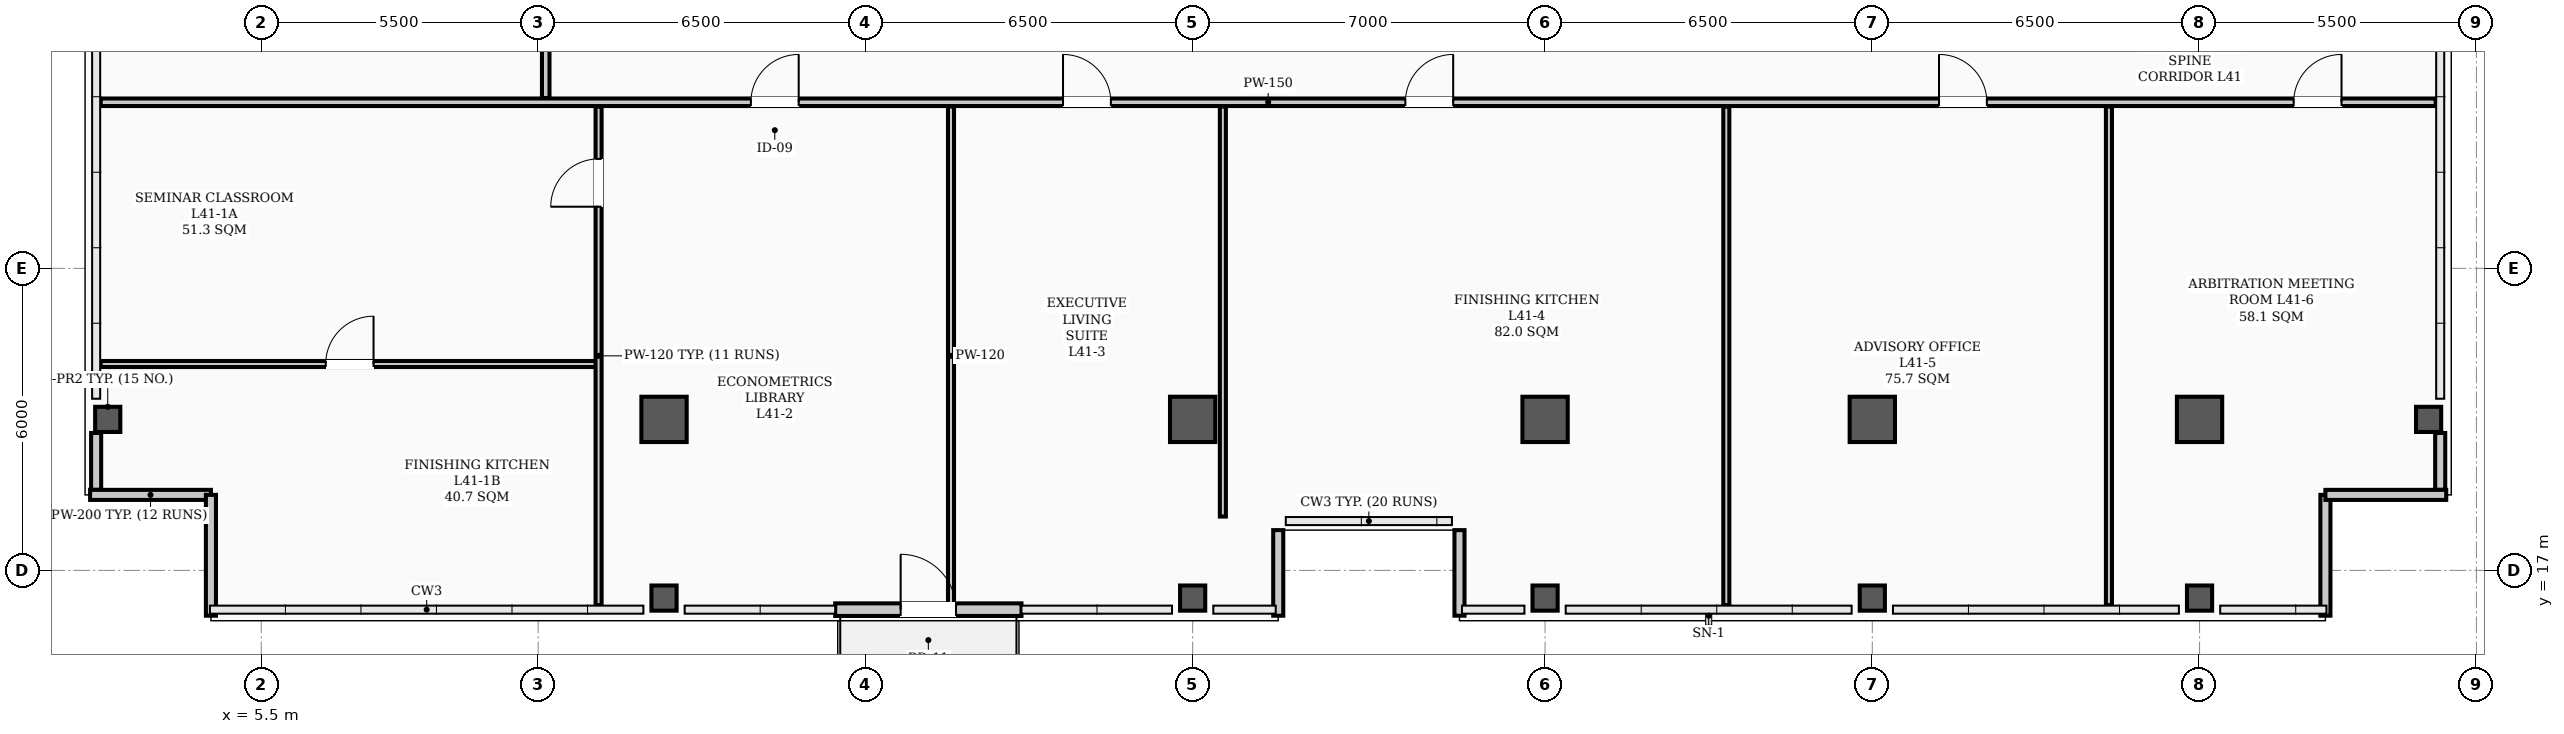
"""IFC4 building model, lengths in metres.
Left out: names, types, materials, properties, quantities, classifications, styles, units other than length and angle.
Written with IfcOpenShell. Run it as: python <this file> out.ifc"""

import sys

from ifc_helpers import new_model, si_unit, direction, frame, frame_2d, origin, origin_2d, place, context, subcontext, project, spatial, rectangle, hollow_rectangle, extrude, element, fill, save


model = new_model("IFC4")
c1 = context("Model", 3, precision=1e-05, world=origin(), true_north=direction((0.0, 1.0)))
c2 = subcontext(c1, "Body", "Model", "MODEL_VIEW")
j1 = project(units=[si_unit("LENGTHUNIT", "METRE"), si_unit("PLANEANGLEUNIT", "RADIAN")], contexts=[c1])
p1 = place(None, origin())
s1 = spatial("IfcSite", under=j1, at=p1, CompositionType="ELEMENT")
p2 = place(p1, origin())
s2 = spatial("IfcBuilding", under=s1, at=p2, CompositionType="ELEMENT")
p3 = place(p2, frame((0.0, 0.0, 165.6)))
s3 = spatial("IfcBuildingStorey", under=s2, at=p3, CompositionType="ELEMENT", Elevation=165.6)
for number, where, z_axis, x_axis in (
    (1, (13.5, 20.0, 0.0), (0.0, 0.0, 1.0), (1.0, 0.0, 0.0)),
    (2, (24.0, 20.0, 0.0), (0.0, 0.0, 1.0), (1.0, 0.0, 0.0)),
    (3, (31.0, 20.0, 0.0), (0.0, 0.0, 1.0), (1.0, 0.0, 0.0)),
    (4, (37.5, 20.0, 0.0), (0.0, 0.0, 1.0), (1.0, 0.0, 0.0)),
    (5, (44.0, 20.0, 0.0), (0.0, 0.0, 1.0), (1.0, 0.0, 0.0)),
):
    element("IfcColumn", number, at=place(p3, frame(where, z_axis=z_axis, x_axis=x_axis)), inside=s3, PredefinedType="COLUMN", context=c2, shape_type="SweptSolid", body=[
        extrude(hollow_rectangle(XDim=0.9, YDim=0.9, WallThickness=0.035, InnerFilletRadius=0.017, OuterFilletRadius=0.052, at=origin_2d()), origin(), (0.0, 0.0, 1.0), 3.9),
    ])
for number, where, z_axis, x_axis in (
    (6, (2.45, 20.0, 0.0), (0.0, 0.0, 1.0), (1.0, 0.0, 0.0)),
    (7, (13.5, 16.45, 0.0), (0.0, 0.0, 1.0), (1.0, 0.0, 0.0)),
    (8, (24.0, 16.45, 0.0), (0.0, 0.0, 1.0), (1.0, 0.0, 0.0)),
    (9, (31.0, 16.45, 0.0), (0.0, 0.0, 1.0), (1.0, 0.0, 0.0)),
    (10, (37.5, 16.45, 0.0), (0.0, 0.0, 1.0), (1.0, 0.0, 0.0)),
    (11, (44.0, 16.45, 0.0), (0.0, 0.0, 1.0), (1.0, 0.0, 0.0)),
):
    element("IfcColumn", number, at=place(p3, frame(where, z_axis=z_axis, x_axis=x_axis)), inside=s3, PredefinedType="COLUMN", context=c2, shape_type="SweptSolid", body=[
        extrude(hollow_rectangle(XDim=0.5, YDim=0.5, WallThickness=0.024, InnerFilletRadius=0.012, OuterFilletRadius=0.036, at=origin_2d()), origin(), (0.0, 0.0, 1.0), 3.66),
    ])
p4 = place(p3, frame((48.55, 20.0, 0.0), z_axis=(0.0, 0.0, 1.0), x_axis=(1.0, 0.0, 0.0)))
e12 = element("IfcColumn", 12, at=p4, inside=s3, PredefinedType="COLUMN", context=c2, shape_type="SweptSolid", body=[
    extrude(hollow_rectangle(XDim=0.5, YDim=0.5, WallThickness=0.024, InnerFilletRadius=0.012, OuterFilletRadius=0.036, at=origin_2d()), origin(), (0.0, 0.0, 1.0), 3.9),
])
for number, where, z_axis, x_axis in (
    (13, (2.22, 18.6, 0.0), (0.0, 0.0, 1.0), (0.0, 1.0, 0.0)),
    (14, (48.78, 18.6, 0.0), (0.0, 0.0, 1.0), (0.0, 1.0, 0.0)),
):
    element("IfcWall", number, at=place(p3, frame(where, z_axis=z_axis, x_axis=x_axis)), inside=s3, PredefinedType="PARAPET", context=c2, shape_type="SweptSolid", body=[
        extrude(rectangle(XDim=1.13, YDim=0.2, at=frame_2d((0.565, 0.0))), origin(), (0.0, 0.0, 1.0), 1.2),
    ])
for number, where, z_axis, x_axis in (
    (15, (2.1, 18.5, 0.0), (0.0, 0.0, 1.0), (1.0, 0.0, 0.0)),
    (16, (4.5, 18.5, 0.0), (0.0, 0.0, 1.0), (0.0, -1.0, 0.0)),
    (17, (46.5, 16.1, 0.0), (0.0, 0.0, 1.0), (0.0, 1.0, 0.0)),
    (18, (46.5, 18.5, 0.0), (0.0, 0.0, 1.0), (1.0, 0.0, 0.0)),
):
    element("IfcWall", number, at=place(p3, frame(where, z_axis=z_axis, x_axis=x_axis)), inside=s3, PredefinedType="PARAPET", context=c2, shape_type="SweptSolid", body=[
        extrude(rectangle(XDim=2.4, YDim=0.2, at=frame_2d((1.2, 0.0))), origin(), (0.0, 0.0, 1.0), 1.2),
    ])
for number, where, z_axis, x_axis in (
    (19, (25.7, 16.1, 0.0), (0.0, 0.0, 1.0), (0.0, 1.0, 0.0)),
    (20, (29.3, 17.8, 0.0), (0.0, 0.0, 1.0), (0.0, -1.0, 0.0)),
):
    element("IfcWall", number, at=place(p3, frame(where, z_axis=z_axis, x_axis=x_axis)), inside=s3, PredefinedType="PARAPET", context=c2, shape_type="SweptSolid", body=[
        extrude(rectangle(XDim=1.7, YDim=0.2, at=frame_2d((0.85, 0.0))), origin(), (0.0, 0.0, 1.0), 1.2),
    ])
p5 = place(p3, frame((16.9, 16.22, 0.0), z_axis=(0.0, 0.0, 1.0), x_axis=(1.0, 0.0, 0.0)))
e21 = element("IfcWall", 21, at=p5, inside=s3, PredefinedType="STANDARD", context=c2, shape_type="SweptSolid", body=[
    extrude(rectangle(XDim=3.7, YDim=0.25, at=frame_2d((1.85, 0.0))), origin(), (0.0, 0.0, 1.0), 2.22),
])
p6 = place(p5, frame((1.3, 0.0, 0.0)))
e22 = element("IfcOpeningElement", 22, at=p6, cuts=e21, PredefinedType="OPENING", context=c2, shape_type="SweptSolid", body=[
    extrude(rectangle(XDim=1.1, YDim=2.2, at=frame_2d((0.55, 1.1))), frame((0.0, 0.135, 0.0), z_axis=(0.0, -1.0, 0.0), x_axis=(1.0, 0.0, 0.0)), (0.0, 0.0, 1.0), 0.27),
])
p7 = place(p3, frame((2.31, 26.3, 0.0), z_axis=(0.0, 0.0, 1.0), x_axis=(1.0, 0.0, 0.0)))
e23 = element("IfcWall", 23, at=p7, inside=s3, PredefinedType="PARTITIONING", context=c2, shape_type="SweptSolid", body=[
    extrude(rectangle(XDim=46.38, YDim=0.15, at=frame_2d((23.19, 0.0))), origin(), (0.0, 0.0, 1.0), 2.24),
])
p8 = place(p7, frame((12.915, 0.0, 0.0)))
e24 = element("IfcOpeningElement", 24, at=p8, cuts=e23, PredefinedType="OPENING", context=c2, shape_type="SweptSolid", body=[
    extrude(rectangle(XDim=0.95, YDim=2.08, at=frame_2d((0.475, 1.04))), frame((0.0, 0.085, 0.0), z_axis=(0.0, -1.0, 0.0), x_axis=(1.0, 0.0, 0.0)), (0.0, 0.0, 1.0), 0.17),
])
p9 = place(p7, frame((19.115, 0.0, 0.0)))
e25 = element("IfcOpeningElement", 25, at=p9, cuts=e23, PredefinedType="OPENING", context=c2, shape_type="SweptSolid", body=[
    extrude(rectangle(XDim=0.95, YDim=2.08, at=frame_2d((0.475, 1.04))), frame((0.0, 0.085, 0.0), z_axis=(0.0, -1.0, 0.0), x_axis=(1.0, 0.0, 0.0)), (0.0, 0.0, 1.0), 0.17),
])
p10 = place(p7, frame((25.915, 0.0, 0.0)))
e26 = element("IfcOpeningElement", 26, at=p10, cuts=e23, PredefinedType="OPENING", context=c2, shape_type="SweptSolid", body=[
    extrude(rectangle(XDim=0.95, YDim=2.08, at=frame_2d((0.475, 1.04))), frame((0.0, 0.085, 0.0), z_axis=(0.0, -1.0, 0.0), x_axis=(1.0, 0.0, 0.0)), (0.0, 0.0, 1.0), 0.17),
])
p11 = place(p7, frame((36.515, 0.0, 0.0)))
e27 = element("IfcOpeningElement", 27, at=p11, cuts=e23, PredefinedType="OPENING", context=c2, shape_type="SweptSolid", body=[
    extrude(rectangle(XDim=0.95, YDim=2.08, at=frame_2d((0.475, 1.04))), frame((0.0, 0.085, 0.0), z_axis=(0.0, -1.0, 0.0), x_axis=(1.0, 0.0, 0.0)), (0.0, 0.0, 1.0), 0.17),
])
p12 = place(p7, frame((43.56, 0.0, 0.0)))
e28 = element("IfcOpeningElement", 28, at=p12, cuts=e23, PredefinedType="OPENING", context=c2, shape_type="SweptSolid", body=[
    extrude(rectangle(XDim=0.95, YDim=2.08, at=frame_2d((0.475, 1.04))), frame((0.0, 0.085, 0.0), z_axis=(0.0, -1.0, 0.0), x_axis=(1.0, 0.0, 0.0)), (0.0, 0.0, 1.0), 0.17),
])
p13 = place(p3, frame((2.31, 21.1, 0.0), z_axis=(0.0, 0.0, 1.0), x_axis=(1.0, 0.0, 0.0)))
e29 = element("IfcWall", 29, at=p13, inside=s3, PredefinedType="PARTITIONING", context=c2, shape_type="SweptSolid", body=[
    extrude(rectangle(XDim=9.89, YDim=0.12, at=frame_2d((4.945, 0.0))), origin(), (0.0, 0.0, 1.0), 2.24),
])
p14 = place(p13, frame((4.47, 0.0, 0.0)))
e30 = element("IfcOpeningElement", 30, at=p14, cuts=e29, PredefinedType="OPENING", context=c2, shape_type="SweptSolid", body=[
    extrude(rectangle(XDim=0.95, YDim=2.08, at=frame_2d((0.475, 1.04))), frame((0.0, 0.07, 0.0), z_axis=(0.0, -1.0, 0.0), x_axis=(1.0, 0.0, 0.0)), (0.0, 0.0, 1.0), 0.14),
])
p15 = place(p3, frame((11.15, 26.385, 0.0), z_axis=(0.0, 0.0, 1.0), x_axis=(0.0, 1.0, 0.0)))
e31 = element("IfcWall", 31, at=p15, inside=s3, PredefinedType="PARTITIONING", context=c2, shape_type="SweptSolid", body=[
    extrude(rectangle(XDim=13.58, YDim=0.15, at=frame_2d((6.79, 0.0))), origin(), (0.0, 0.0, 1.0), 2.24),
])
p16 = place(p15, frame((6.315, 0.0, 0.0)))
e32 = element("IfcOpeningElement", 32, at=p16, cuts=e31, PredefinedType="OPENING", context=c2, shape_type="SweptSolid", body=[
    extrude(rectangle(XDim=0.95, YDim=2.08, at=frame_2d((0.475, 1.04))), frame((0.0, 0.085, 0.0), z_axis=(0.0, -1.0, 0.0), x_axis=(1.0, 0.0, 0.0)), (0.0, 0.0, 1.0), 0.17),
])
p17 = place(p3, frame((12.2, 16.31, 0.0), z_axis=(0.0, 0.0, 1.0), x_axis=(0.0, 1.0, 0.0)))
e33 = element("IfcWall", 33, at=p17, inside=s3, PredefinedType="PARTITIONING", context=c2, shape_type="SweptSolid", body=[
    extrude(rectangle(XDim=9.905, YDim=0.12, at=frame_2d((4.953, 0.0))), origin(), (0.0, 0.0, 1.0), 2.24),
])
p18 = place(p17, frame((7.915, 0.0, 0.0)))
e34 = element("IfcOpeningElement", 34, at=p18, cuts=e33, PredefinedType="OPENING", context=c2, shape_type="SweptSolid", body=[
    extrude(rectangle(XDim=0.95, YDim=2.08, at=frame_2d((0.475, 1.04))), frame((0.0, 0.07, 0.0), z_axis=(0.0, -1.0, 0.0), x_axis=(1.0, 0.0, 0.0)), (0.0, 0.0, 1.0), 0.14),
])
p19 = place(p3, frame((19.2, 16.31, 0.0), z_axis=(0.0, 0.0, 1.0), x_axis=(0.0, 1.0, 0.0)))
e35 = element("IfcWall", 35, at=p19, inside=s3, PredefinedType="PARTITIONING", context=c2, shape_type="SweptSolid", body=[
    extrude(rectangle(XDim=9.905, YDim=0.12, at=frame_2d((4.953, 0.0))), origin(), (0.0, 0.0, 1.0), 2.24),
])
p20 = place(p3, frame((24.6, 18.07, 0.0), z_axis=(0.0, 0.0, 1.0), x_axis=(0.0, 1.0, 0.0)))
e36 = element("IfcWall", 36, at=p20, inside=s3, PredefinedType="PARTITIONING", context=c2, shape_type="SweptSolid", body=[
    extrude(rectangle(XDim=8.145, YDim=0.12, at=frame_2d((4.073, 0.0))), origin(), (0.0, 0.0, 1.0), 2.24),
])
for number, where, z_axis, x_axis in (
    (37, (34.6, 16.31, 0.0), (0.0, 0.0, 1.0), (0.0, 1.0, 0.0)),
    (38, (42.2, 16.31, 0.0), (0.0, 0.0, 1.0), (0.0, 1.0, 0.0)),
):
    element("IfcWall", number, at=place(p3, frame(where, z_axis=z_axis, x_axis=x_axis)), inside=s3, PredefinedType="PARTITIONING", context=c2, shape_type="SweptSolid", body=[
        extrude(rectangle(XDim=9.905, YDim=0.12, at=frame_2d((4.953, 0.0))), origin(), (0.0, 0.0, 1.0), 2.24),
    ])
p21 = place(p6, origin())
e39 = element("IfcDoor", 39, at=p21, inside=s3, OperationType="SINGLE_SWING_LEFT", PredefinedType="DOOR", context=c2, shape_type="SweptSolid", body=[
    extrude(rectangle(XDim=1.1, YDim=2.2, at=frame_2d((0.55, 1.1))), frame((0.0, 0.025, 0.0), z_axis=(0.0, -1.0, 0.0), x_axis=(1.0, 0.0, 0.0)), (0.0, 0.0, 1.0), 0.05),
])
fill(e22, e39)
p22 = place(p14, origin())
e40 = element("IfcDoor", 40, at=p22, inside=s3, OperationType="SINGLE_SWING_RIGHT", PredefinedType="DOOR", context=c2, shape_type="SweptSolid", body=[
    extrude(rectangle(XDim=0.95, YDim=2.08, at=frame_2d((0.475, 1.04))), frame((0.0, 0.025, 0.0), z_axis=(0.0, -1.0, 0.0), x_axis=(1.0, 0.0, 0.0)), (0.0, 0.0, 1.0), 0.05),
])
fill(e30, e40)
p23 = place(p18, origin())
e41 = element("IfcDoor", 41, at=p23, inside=s3, OperationType="SINGLE_SWING_LEFT", PredefinedType="DOOR", context=c2, shape_type="SweptSolid", body=[
    extrude(rectangle(XDim=0.95, YDim=2.08, at=frame_2d((0.475, 1.04))), frame((0.0, 0.025, 0.0), z_axis=(0.0, -1.0, 0.0), x_axis=(1.0, 0.0, 0.0)), (0.0, 0.0, 1.0), 0.05),
])
fill(e34, e41)
p24 = place(p8, origin())
e42 = element("IfcDoor", 42, at=p24, inside=s3, OperationType="SINGLE_SWING_RIGHT", PredefinedType="DOOR", context=c2, shape_type="SweptSolid", body=[
    extrude(rectangle(XDim=0.95, YDim=2.08, at=frame_2d((0.475, 1.04))), frame((0.0, 0.025, 0.0), z_axis=(0.0, -1.0, 0.0), x_axis=(1.0, 0.0, 0.0)), (0.0, 0.0, 1.0), 0.05),
])
fill(e24, e42)
p25 = place(p9, origin())
e43 = element("IfcDoor", 43, at=p25, inside=s3, OperationType="SINGLE_SWING_LEFT", PredefinedType="DOOR", context=c2, shape_type="SweptSolid", body=[
    extrude(rectangle(XDim=0.95, YDim=2.08, at=frame_2d((0.475, 1.04))), frame((0.0, 0.025, 0.0), z_axis=(0.0, -1.0, 0.0), x_axis=(1.0, 0.0, 0.0)), (0.0, 0.0, 1.0), 0.05),
])
fill(e25, e43)
p26 = place(p10, origin())
e44 = element("IfcDoor", 44, at=p26, inside=s3, OperationType="SINGLE_SWING_RIGHT", PredefinedType="DOOR", context=c2, shape_type="SweptSolid", body=[
    extrude(rectangle(XDim=0.95, YDim=2.08, at=frame_2d((0.475, 1.04))), frame((0.0, 0.025, 0.0), z_axis=(0.0, -1.0, 0.0), x_axis=(1.0, 0.0, 0.0)), (0.0, 0.0, 1.0), 0.05),
])
fill(e26, e44)
p27 = place(p11, origin())
e45 = element("IfcDoor", 45, at=p27, inside=s3, OperationType="SINGLE_SWING_LEFT", PredefinedType="DOOR", context=c2, shape_type="SweptSolid", body=[
    extrude(rectangle(XDim=0.95, YDim=2.08, at=frame_2d((0.475, 1.04))), frame((0.0, 0.025, 0.0), z_axis=(0.0, -1.0, 0.0), x_axis=(1.0, 0.0, 0.0)), (0.0, 0.0, 1.0), 0.05),
])
fill(e27, e45)
p28 = place(p12, origin())
e46 = element("IfcDoor", 46, at=p28, inside=s3, OperationType="SINGLE_SWING_RIGHT", PredefinedType="DOOR", context=c2, shape_type="SweptSolid", body=[
    extrude(rectangle(XDim=0.95, YDim=2.08, at=frame_2d((0.475, 1.04))), frame((0.0, 0.025, 0.0), z_axis=(0.0, -1.0, 0.0), x_axis=(1.0, 0.0, 0.0)), (0.0, 0.0, 1.0), 0.05),
])
fill(e28, e46)
save(model, sys.argv[1])
